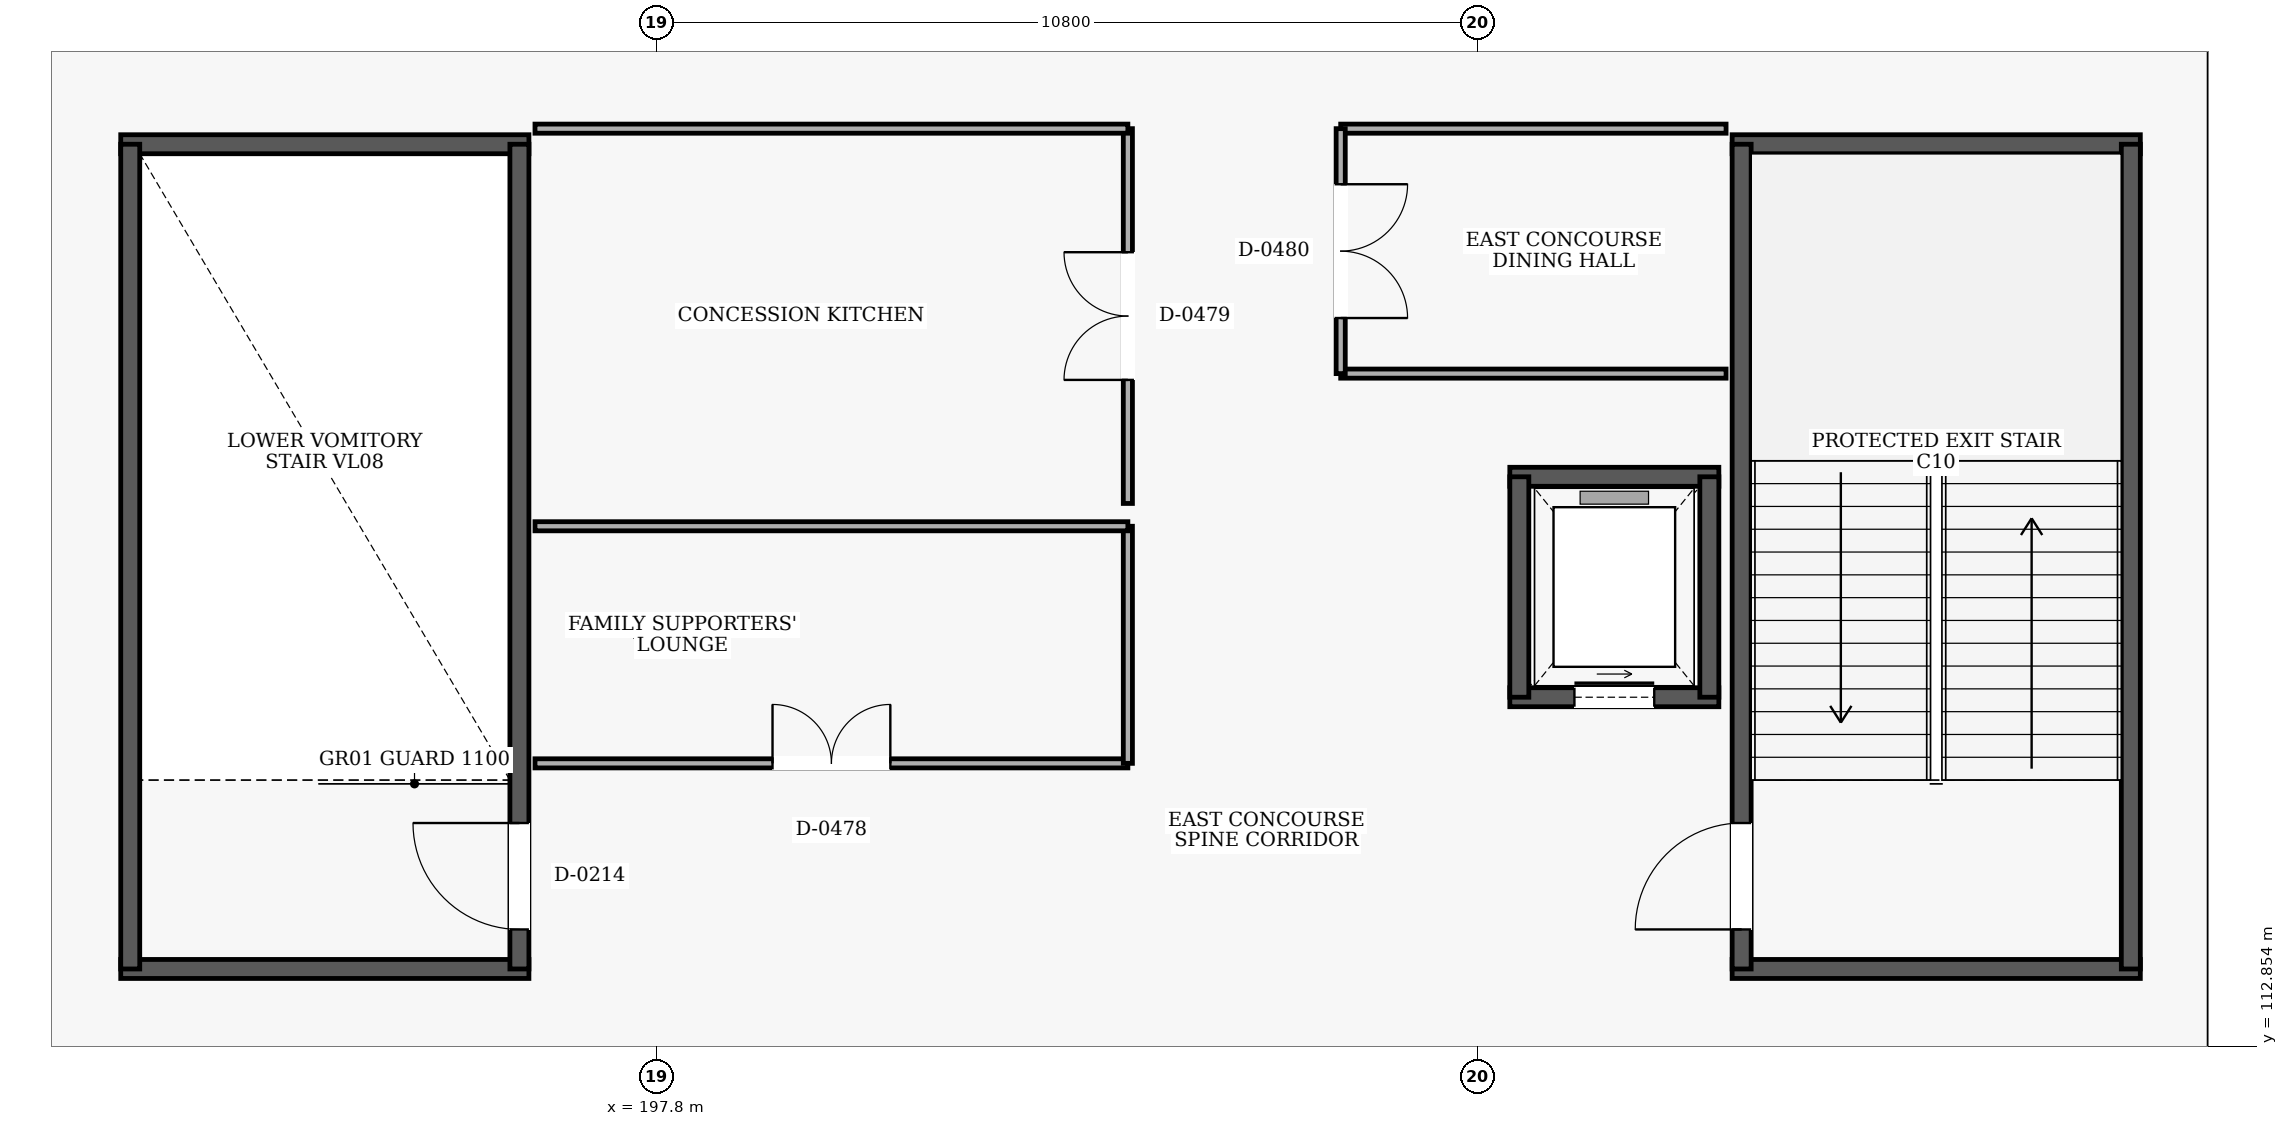
"""IFC4 building model, lengths in metres.
Left out: names, types, materials, properties, quantities, classifications, styles, units other than length and angle.
Written with IfcOpenShell. Run it as: python <this file> out.ifc"""

import sys

from ifc_helpers import new_model, si_unit, direction, frame, frame_2d, origin, place, context, subcontext, project, spatial, rectangle, extrude, element, fill, save


model = new_model("IFC4")
c1 = context("Model", 3, precision=1e-05, world=origin(), true_north=direction((0.0, 1.0)))
c2 = subcontext(c1, "Body", "Model", "MODEL_VIEW")
j1 = project(units=[si_unit("LENGTHUNIT", "METRE"), si_unit("PLANEANGLEUNIT", "RADIAN")], contexts=[c1])
p1 = place(None, origin())
s1 = spatial("IfcSite", under=j1, at=p1, CompositionType="ELEMENT")
p2 = place(p1, origin())
s2 = spatial("IfcBuilding", under=s1, at=p2, CompositionType="ELEMENT")
p3 = place(p2, frame((0.0, 0.0, 5.4)))
s3 = spatial("IfcBuildingStorey", under=s2, at=p3, CompositionType="ELEMENT", Elevation=5.4)
for number, where, z_axis, x_axis in (
    (1, (211.95, 113.875, 0.0), (0.0, 0.0, 1.0), (1.0, 0.0, 0.0)),
    (2, (217.32, 124.725, 0.0), (0.0, 0.0, 1.0), (-1.0, 0.0, 0.0)),
):
    element("IfcWall", number, at=place(p3, frame(where, z_axis=z_axis, x_axis=x_axis)), inside=s3, PredefinedType="SHEAR", context=c2, shape_type="SweptSolid", body=[
        extrude(rectangle(XDim=5.37, YDim=0.25, at=frame_2d((2.685, 0.0))), origin(), (0.0, 0.0, 1.0), 4.5),
    ])
p4 = place(p3, frame((212.075, 113.875, 0.0), z_axis=(0.0, 0.0, 1.0), x_axis=(0.0, 1.0, 0.0)))
e3 = element("IfcWall", 3, at=p4, inside=s3, PredefinedType="SHEAR", context=c2, shape_type="SweptSolid", body=[
    extrude(rectangle(XDim=10.85, YDim=0.25, at=frame_2d((5.425, 0.0))), origin(), (0.0, 0.0, 1.0), 4.5),
])
p5 = place(p4, frame((0.52, 0.0, 0.0)))
e4 = element("IfcOpeningElement", 4, at=p5, cuts=e3, PredefinedType="OPENING", context=c2, shape_type="SweptSolid", body=[
    extrude(rectangle(XDim=1.4, YDim=2.15, at=frame_2d((0.7, 1.075))), frame((0.0, 0.135, 0.0), z_axis=(0.0, -1.0, 0.0), x_axis=(1.0, 0.0, 0.0)), (0.0, 0.0, 1.0), 0.27),
])
p6 = place(p3, frame((217.195, 113.875, 0.0), z_axis=(0.0, 0.0, 1.0), x_axis=(0.0, 1.0, 0.0)))
e5 = element("IfcWall", 5, at=p6, inside=s3, PredefinedType="SHEAR", context=c2, shape_type="SweptSolid", body=[
    extrude(rectangle(XDim=10.85, YDim=0.25, at=frame_2d((5.425, 0.0))), origin(), (0.0, 0.0, 1.0), 4.5),
])
for number, where, z_axis, x_axis in (
    (6, (190.75, 113.875, 0.0), (0.0, 0.0, 1.0), (1.0, 0.0, 0.0)),
    (7, (196.12, 124.725, 0.0), (0.0, 0.0, 1.0), (-1.0, 0.0, 0.0)),
):
    element("IfcWall", number, at=place(p3, frame(where, z_axis=z_axis, x_axis=x_axis)), inside=s3, PredefinedType="SHEAR", context=c2, shape_type="SweptSolid", body=[
        extrude(rectangle(XDim=5.37, YDim=0.25, at=frame_2d((2.685, 0.0))), origin(), (0.0, 0.0, 1.0), 4.5),
    ])
p7 = place(p3, frame((190.875, 113.875, 0.0), z_axis=(0.0, 0.0, 1.0), x_axis=(0.0, 1.0, 0.0)))
e8 = element("IfcWall", 8, at=p7, inside=s3, PredefinedType="SHEAR", context=c2, shape_type="SweptSolid", body=[
    extrude(rectangle(XDim=10.85, YDim=0.25, at=frame_2d((5.425, 0.0))), origin(), (0.0, 0.0, 1.0), 4.5),
])
p8 = place(p3, frame((195.995, 113.875, 0.0), z_axis=(0.0, 0.0, 1.0), x_axis=(0.0, 1.0, 0.0)))
e9 = element("IfcWall", 9, at=p8, inside=s3, PredefinedType="SHEAR", context=c2, shape_type="SweptSolid", body=[
    extrude(rectangle(XDim=10.85, YDim=0.25, at=frame_2d((5.425, 0.0))), origin(), (0.0, 0.0, 1.0), 4.5),
])
p9 = place(p8, frame((0.52, 0.0, 0.0)))
e10 = element("IfcOpeningElement", 10, at=p9, cuts=e9, PredefinedType="OPENING", context=c2, shape_type="SweptSolid", body=[
    extrude(rectangle(XDim=1.4, YDim=2.15, at=frame_2d((0.7, 1.075))), frame((0.0, 0.135, 0.0), z_axis=(0.0, -1.0, 0.0), x_axis=(1.0, 0.0, 0.0)), (0.0, 0.0, 1.0), 0.27),
])
p10 = place(p3, frame((209.025, 117.45, 0.0), z_axis=(0.0, 0.0, 1.0), x_axis=(1.0, 0.0, 0.0)))
e11 = element("IfcWall", 11, at=p10, inside=s3, PredefinedType="SHEAR", context=c2, shape_type="SweptSolid", body=[
    extrude(rectangle(XDim=2.75, YDim=0.25, at=frame_2d((1.375, 0.0))), origin(), (0.0, 0.0, 1.0), 4.5),
])
p11 = place(p10, frame((0.85, 0.0, 0.0)))
e12 = element("IfcOpeningElement", 12, at=p11, cuts=e11, PredefinedType="OPENING", context=c2, shape_type="SweptSolid", body=[
    extrude(rectangle(XDim=1.05, YDim=2.15, at=frame_2d((0.525, 1.075))), frame((0.0, 0.135, 0.0), z_axis=(0.0, -1.0, 0.0), x_axis=(1.0, 0.0, 0.0)), (0.0, 0.0, 1.0), 0.27),
])
p12 = place(p3, frame((211.775, 120.35, 0.0), z_axis=(0.0, 0.0, 1.0), x_axis=(-1.0, 0.0, 0.0)))
e13 = element("IfcWall", 13, at=p12, inside=s3, PredefinedType="SHEAR", context=c2, shape_type="SweptSolid", body=[
    extrude(rectangle(XDim=2.75, YDim=0.25, at=frame_2d((1.375, 0.0))), origin(), (0.0, 0.0, 1.0), 4.5),
])
for number, where, z_axis, x_axis in (
    (14, (209.15, 120.35, 0.0), (0.0, 0.0, 1.0), (0.0, -1.0, 0.0)),
    (15, (211.65, 117.45, 0.0), (0.0, 0.0, 1.0), (0.0, 1.0, 0.0)),
):
    element("IfcWall", number, at=place(p3, frame(where, z_axis=z_axis, x_axis=x_axis)), inside=s3, PredefinedType="SHEAR", context=c2, shape_type="SweptSolid", body=[
        extrude(rectangle(XDim=2.9, YDim=0.25, at=frame_2d((1.45, 0.0))), origin(), (0.0, 0.0, 1.0), 4.5),
    ])
p13 = place(p3, frame((196.2, 116.58, 0.0), z_axis=(0.0, 0.0, 1.0), x_axis=(1.0, 0.0, 0.0)))
e16 = element("IfcWall", 16, at=p13, inside=s3, PredefinedType="PARTITIONING", context=c2, shape_type="SweptSolid", body=[
    extrude(rectangle(XDim=7.8, YDim=0.12, at=frame_2d((3.9, 0.0))), origin(), (0.0, 0.0, 1.0), 4.5),
])
p14 = place(p13, frame((3.125, 0.0, 0.0)))
e17 = element("IfcOpeningElement", 17, at=p14, cuts=e16, PredefinedType="OPENING", context=c2, shape_type="SweptSolid", body=[
    extrude(rectangle(XDim=1.55, YDim=2.2, at=frame_2d((0.775, 1.1))), frame((0.0, 0.07, 0.0), z_axis=(0.0, -1.0, 0.0), x_axis=(1.0, 0.0, 0.0)), (0.0, 0.0, 1.0), 0.14),
])
p15 = place(p3, frame((204.0, 116.58, 0.0), z_axis=(0.0, 0.0, 1.0), x_axis=(0.0, 1.0, 0.0)))
e18 = element("IfcWall", 18, at=p15, inside=s3, PredefinedType="PARTITIONING", context=c2, shape_type="SweptSolid", body=[
    extrude(rectangle(XDim=3.119, YDim=0.12, at=frame_2d((1.56, 0.0))), origin(), (0.0, 0.0, 1.0), 4.5),
])
p16 = place(p3, frame((204.0, 119.699, 0.0), z_axis=(0.0, 0.0, 1.0), x_axis=(-1.0, 0.0, 0.0)))
e19 = element("IfcWall", 19, at=p16, inside=s3, PredefinedType="PARTITIONING", context=c2, shape_type="SweptSolid", body=[
    extrude(rectangle(XDim=7.8, YDim=0.12, at=frame_2d((3.9, 0.0))), origin(), (0.0, 0.0, 1.0), 4.5),
])
p17 = place(p3, frame((204.0, 119.999, 0.0), z_axis=(0.0, 0.0, 1.0), x_axis=(0.0, 1.0, 0.0)))
e20 = element("IfcWall", 20, at=p17, inside=s3, PredefinedType="PARTITIONING", context=c2, shape_type="SweptSolid", body=[
    extrude(rectangle(XDim=4.931, YDim=0.12, at=frame_2d((2.465, 0.0))), origin(), (0.0, 0.0, 1.0), 4.5),
])
p18 = place(p17, frame((1.625, 0.0, 0.0)))
e21 = element("IfcOpeningElement", 21, at=p18, cuts=e20, PredefinedType="OPENING", context=c2, shape_type="SweptSolid", body=[
    extrude(rectangle(XDim=1.68, YDim=2.25, at=frame_2d((0.84, 1.125))), frame((0.0, 0.07, 0.0), z_axis=(0.0, -1.0, 0.0), x_axis=(1.0, 0.0, 0.0)), (0.0, 0.0, 1.0), 0.14),
])
p19 = place(p3, frame((204.0, 124.93, 0.0), z_axis=(0.0, 0.0, 1.0), x_axis=(-1.0, 0.0, 0.0)))
e22 = element("IfcWall", 22, at=p19, inside=s3, PredefinedType="PARTITIONING", context=c2, shape_type="SweptSolid", body=[
    extrude(rectangle(XDim=7.8, YDim=0.12, at=frame_2d((3.9, 0.0))), origin(), (0.0, 0.0, 1.0), 4.5),
])
for number, where, z_axis, x_axis in (
    (23, (206.8, 121.708, 0.0), (0.0, 0.0, 1.0), (1.0, 0.0, 0.0)),
    (24, (211.87, 124.93, 0.0), (0.0, 0.0, 1.0), (-1.0, 0.0, 0.0)),
):
    element("IfcWall", number, at=place(p3, frame(where, z_axis=z_axis, x_axis=x_axis)), inside=s3, PredefinedType="PARTITIONING", context=c2, shape_type="SweptSolid", body=[
        extrude(rectangle(XDim=5.07, YDim=0.12, at=frame_2d((2.535, 0.0))), origin(), (0.0, 0.0, 1.0), 4.5),
    ])
p20 = place(p3, frame((206.8, 124.93, 0.0), z_axis=(0.0, 0.0, 1.0), x_axis=(0.0, -1.0, 0.0)))
e25 = element("IfcWall", 25, at=p20, inside=s3, PredefinedType="PARTITIONING", context=c2, shape_type="SweptSolid", body=[
    extrude(rectangle(XDim=3.222, YDim=0.12, at=frame_2d((1.611, 0.0))), origin(), (0.0, 0.0, 1.0), 4.5),
])
p21 = place(p20, frame((0.731, 0.0, 0.0)))
e26 = element("IfcOpeningElement", 26, at=p21, cuts=e25, PredefinedType="OPENING", context=c2, shape_type="SweptSolid", body=[
    extrude(rectangle(XDim=1.76, YDim=2.25, at=frame_2d((0.88, 1.125))), frame((0.0, 0.07, 0.0), z_axis=(0.0, -1.0, 0.0), x_axis=(1.0, 0.0, 0.0)), (0.0, 0.0, 1.0), 0.14),
])
p22 = place(p5, frame((1.4, 0.0, 0.0), z_axis=(0.0, 0.0, 1.0), x_axis=(-1.0, 0.0, 0.0)))
e27 = element("IfcDoor", 27, at=p22, inside=s3, OperationType="SINGLE_SWING_RIGHT", PredefinedType="DOOR", context=c2, shape_type="SweptSolid", body=[
    extrude(rectangle(XDim=1.4, YDim=2.15, at=frame_2d((0.7, 1.075))), frame((0.0, 0.025, 0.0), z_axis=(0.0, -1.0, 0.0), x_axis=(1.0, 0.0, 0.0)), (0.0, 0.0, 1.0), 0.05),
])
fill(e4, e27)
p23 = place(p9, origin())
e28 = element("IfcDoor", 28, at=p23, inside=s3, OperationType="SINGLE_SWING_RIGHT", PredefinedType="DOOR", context=c2, shape_type="SweptSolid", body=[
    extrude(rectangle(XDim=1.4, YDim=2.15, at=frame_2d((0.7, 1.075))), frame((0.0, 0.025, 0.0), z_axis=(0.0, -1.0, 0.0), x_axis=(1.0, 0.0, 0.0)), (0.0, 0.0, 1.0), 0.05),
])
fill(e10, e28)
p24 = place(p11, origin())
e29 = element("IfcDoor", 29, at=p24, inside=s3, OperationType="SLIDING_TO_LEFT", PredefinedType="DOOR", context=c2, shape_type="SweptSolid", body=[
    extrude(rectangle(XDim=1.05, YDim=2.15, at=frame_2d((0.525, 1.075))), frame((0.0, 0.025, 0.0), z_axis=(0.0, -1.0, 0.0), x_axis=(1.0, 0.0, 0.0)), (0.0, 0.0, 1.0), 0.05),
])
fill(e12, e29)
p25 = place(p14, origin())
e30 = element("IfcDoor", 30, at=p25, inside=s3, OperationType="DOUBLE_DOOR_SINGLE_SWING", PredefinedType="DOOR", context=c2, shape_type="SweptSolid", body=[
    extrude(rectangle(XDim=1.55, YDim=2.2, at=frame_2d((0.775, 1.1))), frame((0.0, 0.025, 0.0), z_axis=(0.0, -1.0, 0.0), x_axis=(1.0, 0.0, 0.0)), (0.0, 0.0, 1.0), 0.05),
])
fill(e17, e30)
p26 = place(p18, origin())
e31 = element("IfcDoor", 31, at=p26, inside=s3, OperationType="DOUBLE_DOOR_SINGLE_SWING", PredefinedType="DOOR", context=c2, shape_type="SweptSolid", body=[
    extrude(rectangle(XDim=1.68, YDim=2.25, at=frame_2d((0.84, 1.125))), frame((0.0, 0.025, 0.0), z_axis=(0.0, -1.0, 0.0), x_axis=(1.0, 0.0, 0.0)), (0.0, 0.0, 1.0), 0.05),
])
fill(e21, e31)
p27 = place(p21, origin())
e32 = element("IfcDoor", 32, at=p27, inside=s3, OperationType="DOUBLE_DOOR_SINGLE_SWING", PredefinedType="DOOR", context=c2, shape_type="SweptSolid", body=[
    extrude(rectangle(XDim=1.76, YDim=2.25, at=frame_2d((0.88, 1.125))), frame((0.0, 0.025, 0.0), z_axis=(0.0, -1.0, 0.0), x_axis=(1.0, 0.0, 0.0)), (0.0, 0.0, 1.0), 0.05),
])
fill(e26, e32)
save(model, sys.argv[1])
